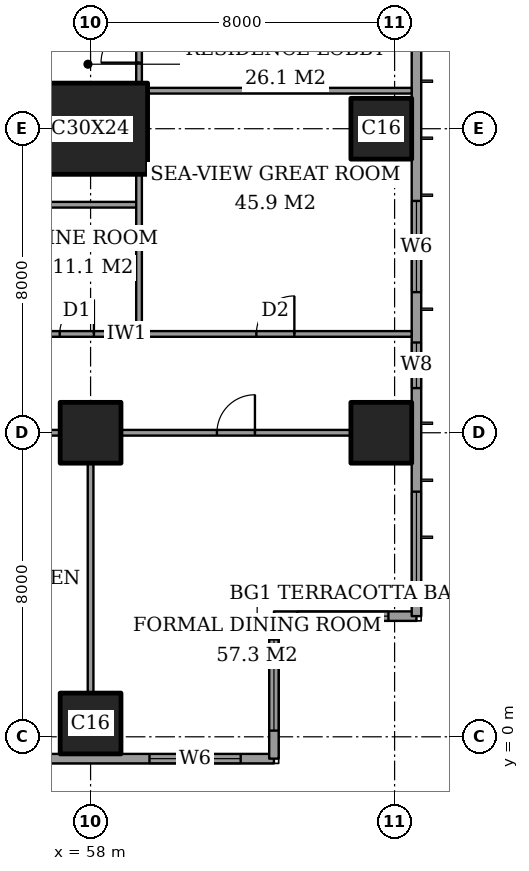
"""IFC4 building model, lengths in metres.
Left out: names, types, materials, properties, quantities, classifications, styles, units other than length and angle.
Written with IfcOpenShell. Run it as: python <this file> out.ifc"""

import sys

from ifc_helpers import new_model, si_unit, direction, frame, frame_2d, origin, origin_2d, place, context, subcontext, project, spatial, rectangle, extrude, element, fill, save


model = new_model("IFC4")
c1 = context("Model", 3, precision=1e-05, world=origin(), true_north=direction((0.0, 1.0)))
c2 = subcontext(c1, "Body", "Model", "MODEL_VIEW")
j1 = project(units=[si_unit("LENGTHUNIT", "METRE"), si_unit("PLANEANGLEUNIT", "RADIAN")], contexts=[c1])
p1 = place(None, origin())
s1 = spatial("IfcSite", under=j1, at=p1, CompositionType="ELEMENT")
p2 = place(p1, origin())
s2 = spatial("IfcBuilding", under=s1, at=p2, CompositionType="ELEMENT")
p3 = place(p2, frame((0.0, 0.0, 273.6)))
s3 = spatial("IfcBuildingStorey", under=s2, at=p3, CompositionType="ELEMENT", Elevation=273.6)
for number, where, z_axis, x_axis in (
    (1, (58.0, 0.35, 0.0), (0.0, 0.0, 1.0), (1.0, 0.0, 0.0)),
    (2, (58.0, 8.0, 0.0), (0.0, 0.0, 1.0), (1.0, 0.0, 0.0)),
):
    element("IfcColumn", number, at=place(p3, frame(where, z_axis=z_axis, x_axis=x_axis)), inside=s3, PredefinedType="COLUMN", context=c2, shape_type="SweptSolid", body=[
        extrude(rectangle(XDim=1.6, YDim=1.6, at=origin_2d()), origin(), (0.0, 0.0, 1.0), 3.6),
    ])
p4 = place(p3, frame((58.0, 16.0, 0.0), z_axis=(0.0, 0.0, 1.0), x_axis=(1.0, 0.0, 0.0)))
e3 = element("IfcColumn", 3, at=p4, inside=s3, PredefinedType="COLUMN", context=c2, shape_type="SweptSolid", body=[
    extrude(rectangle(XDim=3.0, YDim=2.4, at=origin_2d()), origin(), (0.0, 0.0, 1.0), 3.6),
])
for number, where, z_axis, x_axis in (
    (4, (65.65, 8.0, 0.0), (0.0, 0.0, 1.0), (1.0, 0.0, 0.0)),
    (5, (65.65, 16.0, 0.0), (0.0, 0.0, 1.0), (1.0, 0.0, 0.0)),
):
    element("IfcColumn", number, at=place(p3, frame(where, z_axis=z_axis, x_axis=x_axis)), inside=s3, PredefinedType="COLUMN", context=c2, shape_type="SweptSolid", body=[
        extrude(rectangle(XDim=1.6, YDim=1.6, at=origin_2d()), origin(), (0.0, 0.0, 1.0), 3.6),
    ])
p5 = place(p3, frame((41.425, -0.575, 0.0), z_axis=(0.0, 0.0, 1.0), x_axis=(1.0, 0.0, 0.0)))
e6 = element("IfcWall", 6, at=p5, inside=s3, PredefinedType="SOLIDWALL", context=c2, shape_type="SweptSolid", body=[
    extrude(rectangle(XDim=21.4, YDim=0.25, at=frame_2d((10.7, 0.0))), origin(), (0.0, 0.0, 1.0), 3.6),
])
p6 = place(p5, frame((3.65, 0.0, 0.6)))
e7 = element("IfcOpeningElement", 7, at=p6, cuts=e6, PredefinedType="OPENING", context=c2, shape_type="SweptSolid", body=[
    extrude(rectangle(XDim=2.4, YDim=2.0, at=frame_2d((1.2, 1.0))), frame((0.0, 0.135, 0.0), z_axis=(0.0, -1.0, 0.0), x_axis=(1.0, 0.0, 0.0)), (0.0, 0.0, 1.0), 0.27),
])
p7 = place(p5, frame((9.875, 0.0, 0.6)))
e8 = element("IfcOpeningElement", 8, at=p7, cuts=e6, PredefinedType="OPENING", context=c2, shape_type="SweptSolid", body=[
    extrude(rectangle(XDim=1.2, YDim=2.0, at=frame_2d((0.6, 1.0))), frame((0.0, 0.135, 0.0), z_axis=(0.0, -1.0, 0.0), x_axis=(1.0, 0.0, 0.0)), (0.0, 0.0, 1.0), 0.27),
])
p8 = place(p5, frame((12.475, 0.0, 0.6)))
e9 = element("IfcOpeningElement", 9, at=p8, cuts=e6, PredefinedType="OPENING", context=c2, shape_type="SweptSolid", body=[
    extrude(rectangle(XDim=2.4, YDim=2.0, at=frame_2d((1.2, 1.0))), frame((0.0, 0.135, 0.0), z_axis=(0.0, -1.0, 0.0), x_axis=(1.0, 0.0, 0.0)), (0.0, 0.0, 1.0), 0.27),
])
p9 = place(p5, frame((18.125, 0.0, 0.6)))
e10 = element("IfcOpeningElement", 10, at=p9, cuts=e6, PredefinedType="OPENING", context=c2, shape_type="SweptSolid", body=[
    extrude(rectangle(XDim=2.4, YDim=2.0, at=frame_2d((1.2, 1.0))), frame((0.0, 0.135, 0.0), z_axis=(0.0, -1.0, 0.0), x_axis=(1.0, 0.0, 0.0)), (0.0, 0.0, 1.0), 0.27),
])
p10 = place(p3, frame((62.825, -0.575, 0.0), z_axis=(0.0, 0.0, 1.0), x_axis=(0.0, 1.0, 0.0)))
e11 = element("IfcWall", 11, at=p10, inside=s3, PredefinedType="SOLIDWALL", context=c2, shape_type="SweptSolid", body=[
    extrude(rectangle(XDim=3.75, YDim=0.25, at=frame_2d((1.875, 0.0))), origin(), (0.0, 0.0, 1.0), 3.6),
])
p11 = place(p10, frame((0.738, 0.0, 0.6)))
e12 = element("IfcOpeningElement", 12, at=p11, cuts=e11, PredefinedType="OPENING", context=c2, shape_type="SweptSolid", body=[
    extrude(rectangle(XDim=2.4, YDim=2.0, at=frame_2d((1.2, 1.0))), frame((0.0, 0.135, 0.0), z_axis=(0.0, -1.0, 0.0), x_axis=(1.0, 0.0, 0.0)), (0.0, 0.0, 1.0), 0.27),
])
p12 = place(p3, frame((62.825, 3.175, 0.0), z_axis=(0.0, 0.0, 1.0), x_axis=(1.0, 0.0, 0.0)))
e13 = element("IfcWall", 13, at=p12, inside=s3, PredefinedType="SOLIDWALL", context=c2, shape_type="SweptSolid", body=[
    extrude(rectangle(XDim=3.75, YDim=0.25, at=frame_2d((1.875, 0.0))), origin(), (0.0, 0.0, 1.0), 3.6),
])
p13 = place(p12, frame((0.613, 0.0, 0.6)))
e14 = element("IfcOpeningElement", 14, at=p13, cuts=e13, PredefinedType="OPENING", context=c2, shape_type="SweptSolid", body=[
    extrude(rectangle(XDim=2.4, YDim=2.0, at=frame_2d((1.2, 1.0))), frame((0.0, 0.135, 0.0), z_axis=(0.0, -1.0, 0.0), x_axis=(1.0, 0.0, 0.0)), (0.0, 0.0, 1.0), 0.27),
])
p14 = place(p3, frame((66.575, 3.175, 0.0), z_axis=(0.0, 0.0, 1.0), x_axis=(0.0, 1.0, 0.0)))
e15 = element("IfcWall", 15, at=p14, inside=s3, PredefinedType="SOLIDWALL", context=c2, shape_type="SweptSolid", body=[
    extrude(rectangle(XDim=41.65, YDim=0.25, at=frame_2d((20.825, 0.0))), origin(), (0.0, 0.0, 1.0), 3.6),
])
p15 = place(p14, frame((0.875, 0.0, 0.6)))
e16 = element("IfcOpeningElement", 16, at=p15, cuts=e15, PredefinedType="OPENING", context=c2, shape_type="SweptSolid", body=[
    extrude(rectangle(XDim=2.4, YDim=2.0, at=frame_2d((1.2, 1.0))), frame((0.0, 0.135, 0.0), z_axis=(0.0, -1.0, 0.0), x_axis=(1.0, 0.0, 0.0)), (0.0, 0.0, 1.0), 0.27),
])
p16 = place(p14, frame((6.0, 0.0, 0.6)))
e17 = element("IfcOpeningElement", 17, at=p16, cuts=e15, PredefinedType="OPENING", context=c2, shape_type="SweptSolid", body=[
    extrude(rectangle(XDim=1.2, YDim=2.0, at=frame_2d((0.6, 1.0))), frame((0.0, 0.135, 0.0), z_axis=(0.0, -1.0, 0.0), x_axis=(1.0, 0.0, 0.0)), (0.0, 0.0, 1.0), 0.27),
])
p17 = place(p14, frame((8.525, 0.0, 0.6)))
e18 = element("IfcOpeningElement", 18, at=p17, cuts=e15, PredefinedType="OPENING", context=c2, shape_type="SweptSolid", body=[
    extrude(rectangle(XDim=2.4, YDim=2.0, at=frame_2d((1.2, 1.0))), frame((0.0, 0.135, 0.0), z_axis=(0.0, -1.0, 0.0), x_axis=(1.0, 0.0, 0.0)), (0.0, 0.0, 1.0), 0.27),
])
p18 = place(p14, frame((15.725, 0.0, 0.6)))
e19 = element("IfcOpeningElement", 19, at=p18, cuts=e15, PredefinedType="OPENING", context=c2, shape_type="SweptSolid", body=[
    extrude(rectangle(XDim=2.4, YDim=2.0, at=frame_2d((1.2, 1.0))), frame((0.0, 0.135, 0.0), z_axis=(0.0, -1.0, 0.0), x_axis=(1.0, 0.0, 0.0)), (0.0, 0.0, 1.0), 0.27),
])
p19 = place(p14, frame((23.625, 0.0, 0.6)))
e20 = element("IfcOpeningElement", 20, at=p19, cuts=e15, PredefinedType="OPENING", context=c2, shape_type="SweptSolid", body=[
    extrude(rectangle(XDim=2.4, YDim=2.0, at=frame_2d((1.2, 1.0))), frame((0.0, 0.135, 0.0), z_axis=(0.0, -1.0, 0.0), x_axis=(1.0, 0.0, 0.0)), (0.0, 0.0, 1.0), 0.27),
])
p20 = place(p14, frame((30.725, 0.0, 0.6)))
e21 = element("IfcOpeningElement", 21, at=p20, cuts=e15, PredefinedType="OPENING", context=c2, shape_type="SweptSolid", body=[
    extrude(rectangle(XDim=2.4, YDim=2.0, at=frame_2d((1.2, 1.0))), frame((0.0, 0.135, 0.0), z_axis=(0.0, -1.0, 0.0), x_axis=(1.0, 0.0, 0.0)), (0.0, 0.0, 1.0), 0.27),
])
p21 = place(p14, frame((34.525, 0.0, 0.6)))
e22 = element("IfcOpeningElement", 22, at=p21, cuts=e15, PredefinedType="OPENING", context=c2, shape_type="SweptSolid", body=[
    extrude(rectangle(XDim=1.2, YDim=2.0, at=frame_2d((0.6, 1.0))), frame((0.0, 0.135, 0.0), z_axis=(0.0, -1.0, 0.0), x_axis=(1.0, 0.0, 0.0)), (0.0, 0.0, 1.0), 0.27),
])
p22 = place(p14, frame((38.375, 0.0, 0.6)))
e23 = element("IfcOpeningElement", 23, at=p22, cuts=e15, PredefinedType="OPENING", context=c2, shape_type="SweptSolid", body=[
    extrude(rectangle(XDim=2.4, YDim=2.0, at=frame_2d((1.2, 1.0))), frame((0.0, 0.135, 0.0), z_axis=(0.0, -1.0, 0.0), x_axis=(1.0, 0.0, 0.0)), (0.0, 0.0, 1.0), 0.27),
])
p23 = place(p3, frame((51.2, 8.0, 0.0), z_axis=(0.0, 0.0, 1.0), x_axis=(1.0, 0.0, 0.0)))
e24 = element("IfcWall", 24, at=p23, inside=s3, PredefinedType="PARTITIONING", context=c2, shape_type="SweptSolid", body=[
    extrude(rectangle(XDim=6.0, YDim=0.15, at=frame_2d((3.0, 0.0))), origin(), (0.0, 0.0, 1.0), 3.25),
])
p24 = place(p23, frame((3.4, 0.0, 0.0)))
e25 = element("IfcOpeningElement", 25, at=p24, cuts=e24, PredefinedType="OPENING", context=c2, shape_type="SweptSolid", body=[
    extrude(rectangle(XDim=1.0, YDim=2.1, at=frame_2d((0.5, 1.05))), frame((0.0, 0.085, 0.0), z_axis=(0.0, -1.0, 0.0), x_axis=(1.0, 0.0, 0.0)), (0.0, 0.0, 1.0), 0.17),
])
p25 = place(p3, frame((58.8, 8.0, 0.0), z_axis=(0.0, 0.0, 1.0), x_axis=(1.0, 0.0, 0.0)))
e26 = element("IfcWall", 26, at=p25, inside=s3, PredefinedType="PARTITIONING", context=c2, shape_type="SweptSolid", body=[
    extrude(rectangle(XDim=6.05, YDim=0.15, at=frame_2d((3.025, 0.0))), origin(), (0.0, 0.0, 1.0), 3.25),
])
p26 = place(p25, frame((2.525, 0.0, 0.0)))
e27 = element("IfcOpeningElement", 27, at=p26, cuts=e26, PredefinedType="OPENING", context=c2, shape_type="SweptSolid", body=[
    extrude(rectangle(XDim=1.0, YDim=2.1, at=frame_2d((0.5, 1.05))), frame((0.0, 0.085, 0.0), z_axis=(0.0, -1.0, 0.0), x_axis=(1.0, 0.0, 0.0)), (0.0, 0.0, 1.0), 0.17),
])
p27 = place(p3, frame((41.439, 10.6, 0.0), z_axis=(0.0, 0.0, 1.0), x_axis=(1.0, 0.0, 0.0)))
e28 = element("IfcWall", 28, at=p27, inside=s3, PredefinedType="PARTITIONING", context=c2, shape_type="SweptSolid", body=[
    extrude(rectangle(XDim=25.011, YDim=0.15, at=frame_2d((12.505, 0.0))), origin(), (0.0, 0.0, 1.0), 3.25),
])
p28 = place(p27, frame((10.761, 0.0, 0.0)))
e29 = element("IfcOpeningElement", 29, at=p28, cuts=e28, PredefinedType="OPENING", context=c2, shape_type="SweptSolid", body=[
    extrude(rectangle(XDim=1.0, YDim=2.1, at=frame_2d((0.5, 1.05))), frame((0.0, 0.085, 0.0), z_axis=(0.0, -1.0, 0.0), x_axis=(1.0, 0.0, 0.0)), (0.0, 0.0, 1.0), 0.17),
])
p29 = place(p27, frame((20.924, 0.0, 0.0)))
e30 = element("IfcOpeningElement", 30, at=p29, cuts=e28, PredefinedType="OPENING", context=c2, shape_type="SweptSolid", body=[
    extrude(rectangle(XDim=1.0, YDim=2.1, at=frame_2d((0.5, 1.05))), frame((0.0, 0.085, 0.0), z_axis=(0.0, -1.0, 0.0), x_axis=(1.0, 0.0, 0.0)), (0.0, 0.0, 1.0), 0.17),
])
p30 = place(p27, frame((15.749, 0.0, 0.0)))
e31 = element("IfcOpeningElement", 31, at=p30, cuts=e28, PredefinedType="OPENING", context=c2, shape_type="SweptSolid", body=[
    extrude(rectangle(XDim=0.9, YDim=2.1, at=frame_2d((0.45, 1.05))), frame((0.0, 0.085, 0.0), z_axis=(0.0, -1.0, 0.0), x_axis=(1.0, 0.0, 0.0)), (0.0, 0.0, 1.0), 0.17),
])
p31 = place(p27, frame((12.961, 0.0, 0.0)))
e32 = element("IfcOpeningElement", 32, at=p31, cuts=e28, PredefinedType="OPENING", context=c2, shape_type="SweptSolid", body=[
    extrude(rectangle(XDim=1.0, YDim=2.1, at=frame_2d((0.5, 1.05))), frame((0.0, 0.085, 0.0), z_axis=(0.0, -1.0, 0.0), x_axis=(1.0, 0.0, 0.0)), (0.0, 0.0, 1.0), 0.17),
])
p32 = place(p27, frame((7.911, 0.0, 0.0)))
e33 = element("IfcOpeningElement", 33, at=p32, cuts=e28, PredefinedType="OPENING", context=c2, shape_type="SweptSolid", body=[
    extrude(rectangle(XDim=0.9, YDim=2.1, at=frame_2d((0.45, 1.05))), frame((0.0, 0.085, 0.0), z_axis=(0.0, -1.0, 0.0), x_axis=(1.0, 0.0, 0.0)), (0.0, 0.0, 1.0), 0.17),
])
p33 = place(p27, frame((2.836, 0.0, 0.0)))
e34 = element("IfcOpeningElement", 34, at=p33, cuts=e28, PredefinedType="OPENING", context=c2, shape_type="SweptSolid", body=[
    extrude(rectangle(XDim=1.0, YDim=2.1, at=frame_2d((0.5, 1.05))), frame((0.0, 0.085, 0.0), z_axis=(0.0, -1.0, 0.0), x_axis=(1.0, 0.0, 0.0)), (0.0, 0.0, 1.0), 0.17),
])
p34 = place(p3, frame((56.0, 14.0, 0.0), z_axis=(0.0, 0.0, 1.0), x_axis=(1.0, 0.0, 0.0)))
e35 = element("IfcWall", 35, at=p34, inside=s3, PredefinedType="PARTITIONING", context=c2, shape_type="SweptSolid", body=[
    extrude(rectangle(XDim=3.275, YDim=0.15, at=frame_2d((1.637, 0.0))), origin(), (0.0, 0.0, 1.0), 3.25),
])
p35 = place(p3, frame((59.5, 17.0, 0.0), z_axis=(0.0, 0.0, 1.0), x_axis=(1.0, 0.0, 0.0)))
e36 = element("IfcWall", 36, at=p35, inside=s3, PredefinedType="PARTITIONING", context=c2, shape_type="SweptSolid", body=[
    extrude(rectangle(XDim=6.95, YDim=0.15, at=frame_2d((3.475, 0.0))), origin(), (0.0, 0.0, 1.0), 3.25),
])
p36 = place(p3, frame((58.0, 1.15, 0.0), z_axis=(0.0, 0.0, 1.0), x_axis=(0.0, 1.0, 0.0)))
e37 = element("IfcWall", 37, at=p36, inside=s3, PredefinedType="PARTITIONING", context=c2, shape_type="SweptSolid", body=[
    extrude(rectangle(XDim=6.05, YDim=0.15, at=frame_2d((3.025, 0.0))), origin(), (0.0, 0.0, 1.0), 3.25),
])
p37 = place(p3, frame((59.275, 10.6, 0.0), z_axis=(0.0, 0.0, 1.0), x_axis=(0.0, 1.0, 0.0)))
e38 = element("IfcWall", 38, at=p37, inside=s3, PredefinedType="PARTITIONING", context=c2, shape_type="SweptSolid", body=[
    extrude(rectangle(XDim=4.2, YDim=0.15, at=frame_2d((2.1, 0.0))), origin(), (0.0, 0.0, 1.0), 3.25),
])
p38 = place(p3, frame((59.275, 17.2, 0.0), z_axis=(0.0, 0.0, 1.0), x_axis=(0.0, 1.0, 0.0)))
e39 = element("IfcWall", 39, at=p38, inside=s3, PredefinedType="PARTITIONING", context=c2, shape_type="SweptSolid", body=[
    extrude(rectangle(XDim=2.45, YDim=0.15, at=frame_2d((1.225, 0.0))), origin(), (0.0, 0.0, 1.0), 3.25),
])
p39 = place(p38, frame((0.538, 0.0, 0.0)))
e40 = element("IfcOpeningElement", 40, at=p39, cuts=e39, PredefinedType="OPENING", context=c2, shape_type="SweptSolid", body=[
    extrude(rectangle(XDim=1.0, YDim=2.1, at=frame_2d((0.5, 1.05))), frame((0.0, 0.085, 0.0), z_axis=(0.0, -1.0, 0.0), x_axis=(1.0, 0.0, 0.0)), (0.0, 0.0, 1.0), 0.17),
])
p40 = place(p9, origin())
e41 = element("IfcWindow", 41, at=p40, inside=s3, PartitioningType="SINGLE_PANEL", PredefinedType="WINDOW", context=c2, shape_type="SweptSolid", body=[
    extrude(rectangle(XDim=2.4, YDim=2.0, at=frame_2d((1.2, 1.0))), frame((0.0, 0.03, 0.0), z_axis=(0.0, -1.0, 0.0), x_axis=(1.0, 0.0, 0.0)), (0.0, 0.0, 1.0), 0.06),
])
fill(e10, e41)
p41 = place(p11, origin())
e42 = element("IfcWindow", 42, at=p41, inside=s3, PartitioningType="SINGLE_PANEL", PredefinedType="WINDOW", context=c2, shape_type="SweptSolid", body=[
    extrude(rectangle(XDim=2.4, YDim=2.0, at=frame_2d((1.2, 1.0))), frame((0.0, 0.03, 0.0), z_axis=(0.0, -1.0, 0.0), x_axis=(1.0, 0.0, 0.0)), (0.0, 0.0, 1.0), 0.06),
])
fill(e12, e42)
p42 = place(p13, origin())
e43 = element("IfcWindow", 43, at=p42, inside=s3, PartitioningType="SINGLE_PANEL", PredefinedType="WINDOW", context=c2, shape_type="SweptSolid", body=[
    extrude(rectangle(XDim=2.4, YDim=2.0, at=frame_2d((1.2, 1.0))), frame((0.0, 0.03, 0.0), z_axis=(0.0, -1.0, 0.0), x_axis=(1.0, 0.0, 0.0)), (0.0, 0.0, 1.0), 0.06),
])
fill(e14, e43)
p43 = place(p15, origin())
e44 = element("IfcWindow", 44, at=p43, inside=s3, PartitioningType="SINGLE_PANEL", PredefinedType="WINDOW", context=c2, shape_type="SweptSolid", body=[
    extrude(rectangle(XDim=2.4, YDim=2.0, at=frame_2d((1.2, 1.0))), frame((0.0, 0.03, 0.0), z_axis=(0.0, -1.0, 0.0), x_axis=(1.0, 0.0, 0.0)), (0.0, 0.0, 1.0), 0.06),
])
fill(e16, e44)
p44 = place(p16, origin())
e45 = element("IfcWindow", 45, at=p44, inside=s3, PartitioningType="SINGLE_PANEL", PredefinedType="WINDOW", context=c2, shape_type="SweptSolid", body=[
    extrude(rectangle(XDim=1.2, YDim=2.0, at=frame_2d((0.6, 1.0))), frame((0.0, 0.03, 0.0), z_axis=(0.0, -1.0, 0.0), x_axis=(1.0, 0.0, 0.0)), (0.0, 0.0, 1.0), 0.06),
])
fill(e17, e45)
p45 = place(p17, origin())
e46 = element("IfcWindow", 46, at=p45, inside=s3, PartitioningType="SINGLE_PANEL", PredefinedType="WINDOW", context=c2, shape_type="SweptSolid", body=[
    extrude(rectangle(XDim=2.4, YDim=2.0, at=frame_2d((1.2, 1.0))), frame((0.0, 0.03, 0.0), z_axis=(0.0, -1.0, 0.0), x_axis=(1.0, 0.0, 0.0)), (0.0, 0.0, 1.0), 0.06),
])
fill(e18, e46)
p46 = place(p26, origin())
e47 = element("IfcDoor", 47, at=p46, inside=s3, OperationType="SINGLE_SWING_LEFT", PredefinedType="DOOR", context=c2, shape_type="SweptSolid", body=[
    extrude(rectangle(XDim=1.0, YDim=2.1, at=frame_2d((0.5, 1.05))), frame((0.0, 0.025, 0.0), z_axis=(0.0, -1.0, 0.0), x_axis=(1.0, 0.0, 0.0)), (0.0, 0.0, 1.0), 0.05),
])
fill(e27, e47)
p47 = place(p29, origin())
e48 = element("IfcDoor", 48, at=p47, inside=s3, OperationType="SINGLE_SWING_LEFT", PredefinedType="DOOR", context=c2, shape_type="SweptSolid", body=[
    extrude(rectangle(XDim=1.0, YDim=2.1, at=frame_2d((0.5, 1.05))), frame((0.0, 0.025, 0.0), z_axis=(0.0, -1.0, 0.0), x_axis=(1.0, 0.0, 0.0)), (0.0, 0.0, 1.0), 0.05),
])
fill(e30, e48)
p48 = place(p39, origin())
e49 = element("IfcDoor", 49, at=p48, inside=s3, OperationType="SINGLE_SWING_RIGHT", PredefinedType="DOOR", context=c2, shape_type="SweptSolid", body=[
    extrude(rectangle(XDim=1.0, YDim=2.1, at=frame_2d((0.5, 1.05))), frame((0.0, 0.025, 0.0), z_axis=(0.0, -1.0, 0.0), x_axis=(1.0, 0.0, 0.0)), (0.0, 0.0, 1.0), 0.05),
])
fill(e40, e49)
p49 = place(p30, origin())
e50 = element("IfcDoor", 50, at=p49, inside=s3, OperationType="SINGLE_SWING_LEFT", PredefinedType="DOOR", context=c2, shape_type="SweptSolid", body=[
    extrude(rectangle(XDim=0.9, YDim=2.1, at=frame_2d((0.45, 1.05))), frame((0.0, 0.025, 0.0), z_axis=(0.0, -1.0, 0.0), x_axis=(1.0, 0.0, 0.0)), (0.0, 0.0, 1.0), 0.05),
])
fill(e31, e50)
save(model, sys.argv[1])
